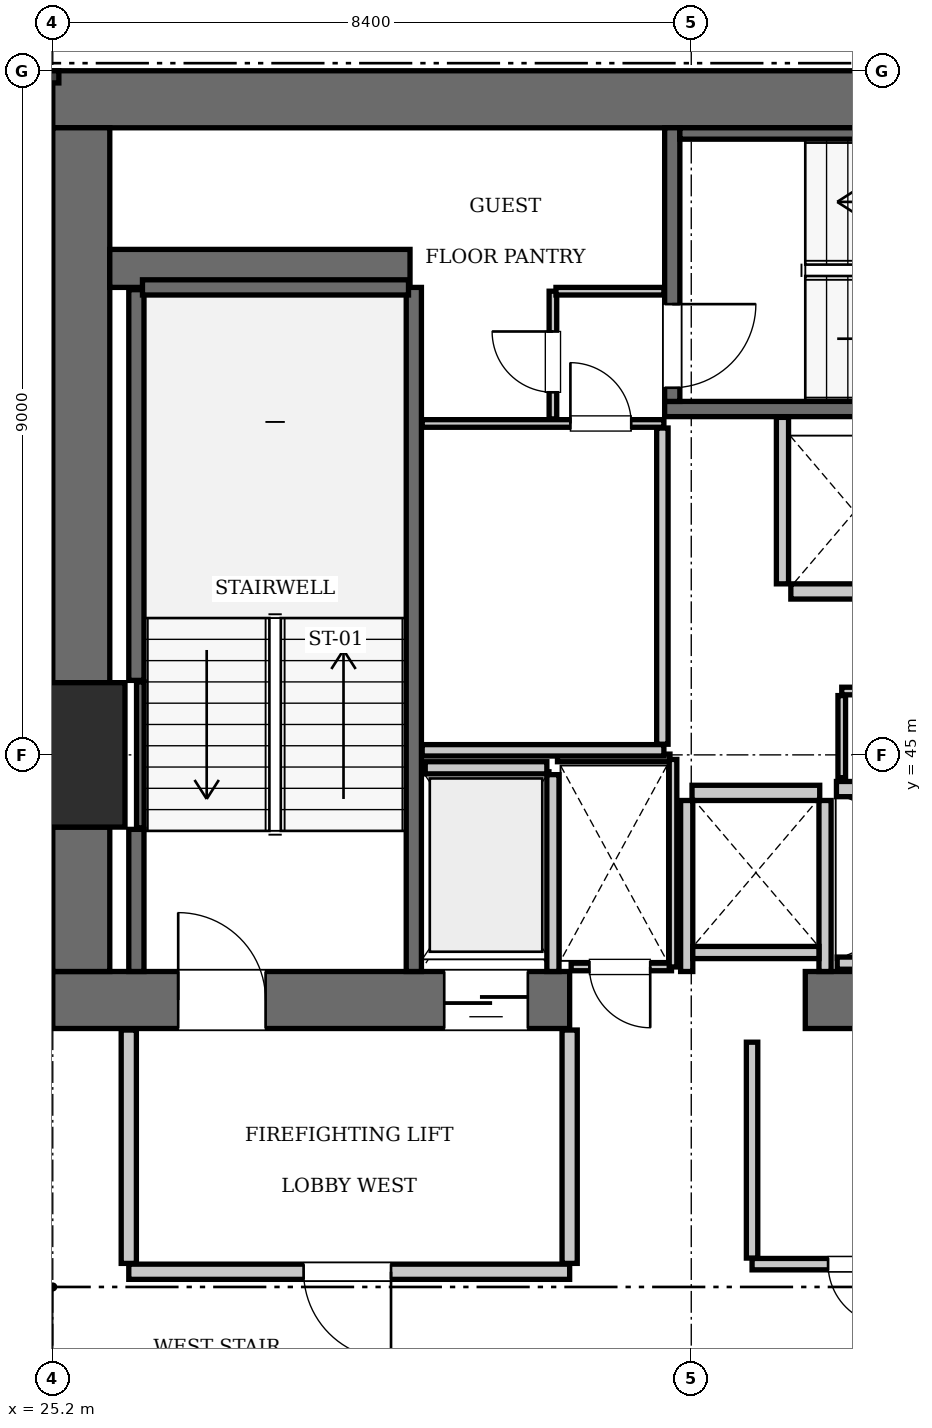
"""IFC4 building model, lengths in metres.
Left out: names, types, materials, properties, quantities, classifications, styles, units other than length and angle.
Written with IfcOpenShell. Run it as: python <this file> out.ifc"""

import sys

from ifc_helpers import new_model, si_unit, direction, frame, frame_2d, origin, origin_2d, place, context, subcontext, project, spatial, rectangle, extrude, element, fill, save


model = new_model("IFC4")
c1 = context("Model", 3, precision=1e-05, world=origin(), true_north=direction((0.0, 1.0)))
c2 = subcontext(c1, "Body", "Model", "MODEL_VIEW")
j1 = project(units=[si_unit("LENGTHUNIT", "METRE"), si_unit("PLANEANGLEUNIT", "RADIAN")], contexts=[c1])
p1 = place(None, origin())
s1 = spatial("IfcSite", under=j1, at=p1, CompositionType="ELEMENT")
p2 = place(p1, origin())
s2 = spatial("IfcBuilding", under=s1, at=p2, CompositionType="ELEMENT")
p3 = place(p2, frame((0.0, 0.0, 192.85)))
s3 = spatial("IfcBuildingStorey", under=s2, at=p3, CompositionType="ELEMENT", Elevation=192.85)
p4 = place(p3, frame((25.2, 45.0, 0.0), z_axis=(0.0, 0.0, 1.0), x_axis=(1.0, 0.0, 0.0)))
e1 = element("IfcColumn", 1, at=p4, inside=s3, PredefinedType="COLUMN", context=c2, shape_type="SweptSolid", body=[
    extrude(rectangle(XDim=1.9, YDim=1.9, at=origin_2d()), origin(), (0.0, 0.0, 1.0), 3.85),
])
p5 = place(p3, frame((25.2, 53.625, 0.0), z_axis=(0.0, 0.0, 1.0), x_axis=(1.0, 0.0, 0.0)))
e2 = element("IfcWall", 2, at=p5, inside=s3, PredefinedType="SHEAR", context=c2, shape_type="SweptSolid", body=[
    extrude(rectangle(XDim=25.2, YDim=0.75, at=frame_2d((12.6, 0.0))), origin(), (0.0, 0.0, 1.0), 3.85),
])
p6 = place(p3, frame((25.2, 41.775, 0.0), z_axis=(0.0, 0.0, 1.0), x_axis=(1.0, 0.0, 0.0)))
e3 = element("IfcWall", 3, at=p6, inside=s3, PredefinedType="SHEAR", context=c2, shape_type="SweptSolid", body=[
    extrude(rectangle(XDim=6.8, YDim=0.75, at=frame_2d((3.4, 0.0))), origin(), (0.0, 0.0, 1.0), 3.85),
])
p7 = place(p6, frame((1.65, 0.0, 0.0)))
e4 = element("IfcOpeningElement", 4, at=p7, cuts=e3, PredefinedType="OPENING", context=c2, shape_type="SweptSolid", body=[
    extrude(rectangle(XDim=1.15, YDim=2.15, at=frame_2d((0.575, 1.075))), frame((0.0, 0.385, 0.0), z_axis=(0.0, -1.0, 0.0), x_axis=(1.0, 0.0, 0.0)), (0.0, 0.0, 1.0), 0.77),
])
p8 = place(p6, frame((5.15, 0.0, 0.0)))
e5 = element("IfcOpeningElement", 5, at=p8, cuts=e3, PredefinedType="OPENING", context=c2, shape_type="SweptSolid", body=[
    extrude(rectangle(XDim=1.1, YDim=2.2, at=frame_2d((0.55, 1.1))), frame((0.0, 0.385, 0.0), z_axis=(0.0, -1.0, 0.0), x_axis=(1.0, 0.0, 0.0)), (0.0, 0.0, 1.0), 0.77),
])
p9 = place(p3, frame((35.1, 41.775, 0.0), z_axis=(0.0, 0.0, 1.0), x_axis=(1.0, 0.0, 0.0)))
e6 = element("IfcWall", 6, at=p9, inside=s3, PredefinedType="SHEAR", context=c2, shape_type="SweptSolid", body=[
    extrude(rectangle(XDim=5.4, YDim=0.75, at=frame_2d((2.7, 0.0))), origin(), (0.0, 0.0, 1.0), 3.85),
])
p10 = place(p3, frame((25.575, 42.15, 0.0), z_axis=(0.0, 0.0, 1.0), x_axis=(0.0, 1.0, 0.0)))
e7 = element("IfcWall", 7, at=p10, inside=s3, PredefinedType="SHEAR", context=c2, shape_type="SweptSolid", body=[
    extrude(rectangle(XDim=1.9, YDim=0.75, at=frame_2d((0.95, 0.0))), origin(), (0.0, 0.0, 1.0), 3.85),
])
p11 = place(p3, frame((25.575, 45.95, 0.0), z_axis=(0.0, 0.0, 1.0), x_axis=(0.0, 1.0, 0.0)))
e8 = element("IfcWall", 8, at=p11, inside=s3, PredefinedType="SHEAR", context=c2, shape_type="SweptSolid", body=[
    extrude(rectangle(XDim=7.3, YDim=0.75, at=frame_2d((3.65, 0.0))), origin(), (0.0, 0.0, 1.0), 3.85),
])
p12 = place(p3, frame((25.95, 51.4, 0.0), z_axis=(0.0, 0.0, 1.0), x_axis=(1.0, 0.0, 0.0)))
e9 = element("IfcWall", 9, at=p12, inside=s3, PredefinedType="SHEAR", context=c2, shape_type="SweptSolid", body=[
    extrude(rectangle(XDim=3.95, YDim=0.5, at=frame_2d((1.975, 0.0))), origin(), (0.0, 0.0, 1.0), 3.85),
])
p13 = place(p3, frame((29.95, 42.15, 0.0), z_axis=(0.0, 0.0, 1.0), x_axis=(0.0, 1.0, 0.0)))
e10 = element("IfcWall", 10, at=p13, inside=s3, PredefinedType="SOLIDWALL", context=c2, shape_type="SweptSolid", body=[
    extrude(rectangle(XDim=9.0, YDim=0.2, at=frame_2d((4.5, 0.0))), origin(), (0.0, 0.0, 1.0), 3.61),
])
p14 = place(p3, frame((26.3, 42.15, 0.0), z_axis=(0.0, 0.0, 1.0), x_axis=(0.0, 1.0, 0.0)))
e11 = element("IfcWall", 11, at=p14, inside=s3, PredefinedType="SOLIDWALL", context=c2, shape_type="SweptSolid", body=[
    extrude(rectangle(XDim=1.87, YDim=0.2, at=frame_2d((0.935, 0.0))), origin(), (0.0, 0.0, 1.0), 3.61),
])
p15 = place(p3, frame((26.3, 45.98, 0.0), z_axis=(0.0, 0.0, 1.0), x_axis=(0.0, 1.0, 0.0)))
e12 = element("IfcWall", 12, at=p15, inside=s3, PredefinedType="SOLIDWALL", context=c2, shape_type="SweptSolid", body=[
    extrude(rectangle(XDim=5.14, YDim=0.2, at=frame_2d((2.57, 0.0))), origin(), (0.0, 0.0, 1.0), 3.61),
])
p16 = place(p3, frame((26.38, 51.15, 0.0), z_axis=(0.0, 0.0, 1.0), x_axis=(1.0, 0.0, 0.0)))
e13 = element("IfcWall", 13, at=p16, inside=s3, PredefinedType="SOLIDWALL", context=c2, shape_type="SweptSolid", body=[
    extrude(rectangle(XDim=3.5, YDim=0.2, at=frame_2d((1.75, 0.0))), origin(), (0.0, 0.0, 1.0), 3.61),
])
p17 = place(p3, frame((26.352, 44.04, 0.0), z_axis=(0.0, 0.0, 1.0), x_axis=(0.0, 1.0, 0.0)))
e14 = element("IfcWall", 14, at=p17, inside=s3, PredefinedType="SOLIDWALL", context=c2, shape_type="SweptSolid", body=[
    extrude(rectangle(XDim=1.92, YDim=0.1, at=frame_2d((0.96, 0.0))), origin(), (0.0, 0.0, 1.0), 3.61),
])
p18 = place(p3, frame((33.25, 49.55, 0.0), z_axis=(0.0, 0.0, 1.0), x_axis=(1.0, 0.0, 0.0)))
e15 = element("IfcWall", 15, at=p18, inside=s3, PredefinedType="SOLIDWALL", context=c2, shape_type="SweptSolid", body=[
    extrude(rectangle(XDim=9.1, YDim=0.2, at=frame_2d((4.55, 0.0))), origin(), (0.0, 0.0, 1.0), 3.61),
])
p19 = place(p3, frame((33.35, 49.65, 0.0), z_axis=(0.0, 0.0, 1.0), x_axis=(0.0, 1.0, 0.0)))
e16 = element("IfcWall", 16, at=p19, inside=s3, PredefinedType="SOLIDWALL", context=c2, shape_type="SweptSolid", body=[
    extrude(rectangle(XDim=3.6, YDim=0.2, at=frame_2d((1.8, 0.0))), origin(), (0.0, 0.0, 1.0), 3.61),
])
p20 = place(p19, frame((0.18, 0.0, 0.0)))
e17 = element("IfcOpeningElement", 17, at=p20, cuts=e16, PredefinedType="OPENING", context=c2, shape_type="SweptSolid", body=[
    extrude(rectangle(XDim=1.1, YDim=2.15, at=frame_2d((0.55, 1.075))), frame((0.0, 0.11, 0.0), z_axis=(0.0, -1.0, 0.0), x_axis=(1.0, 0.0, 0.0)), (0.0, 0.0, 1.0), 0.22),
])
p21 = place(p3, frame((33.45, 53.175, 0.0), z_axis=(0.0, 0.0, 1.0), x_axis=(1.0, 0.0, 0.0)))
e18 = element("IfcWall", 18, at=p21, inside=s3, PredefinedType="SOLIDWALL", context=c2, shape_type="SweptSolid", body=[
    extrude(rectangle(XDim=8.7, YDim=0.15, at=frame_2d((4.35, 0.0))), origin(), (0.0, 0.0, 1.0), 3.61),
])
p22 = place(p3, frame((35.51, 44.55, 0.0), z_axis=(0.0, 0.0, 1.0), x_axis=(1.0, 0.0, 0.0)))
e19 = element("IfcWall", 19, at=p22, inside=s3, PredefinedType="SOLIDWALL", context=c2, shape_type="SweptSolid", body=[
    extrude(rectangle(XDim=1.68, YDim=0.2, at=frame_2d((0.84, 0.0))), origin(), (0.0, 0.0, 1.0), 3.61),
])
p23 = place(p3, frame((34.91, 47.15, 0.0), z_axis=(0.0, 0.0, 1.0), x_axis=(1.0, 0.0, 0.0)))
e20 = element("IfcWall", 20, at=p23, inside=s3, PredefinedType="SOLIDWALL", context=c2, shape_type="SweptSolid", body=[
    extrude(rectangle(XDim=1.68, YDim=0.2, at=frame_2d((0.84, 0.0))), origin(), (0.0, 0.0, 1.0), 3.61),
])
p24 = place(p3, frame((33.61, 44.5, 0.0), z_axis=(0.0, 0.0, 1.0), x_axis=(1.0, 0.0, 0.0)))
e21 = element("IfcWall", 21, at=p24, inside=s3, PredefinedType="SOLIDWALL", context=c2, shape_type="SweptSolid", body=[
    extrude(rectangle(XDim=1.68, YDim=0.2, at=frame_2d((0.84, 0.0))), origin(), (0.0, 0.0, 1.0), 3.61),
])
p25 = place(p3, frame((30.1, 44.83, 0.0), z_axis=(0.0, 0.0, 1.0), x_axis=(1.0, 0.0, 0.0)))
e22 = element("IfcWall", 22, at=p25, inside=s3, PredefinedType="SOLIDWALL", context=c2, shape_type="SweptSolid", body=[
    extrude(rectangle(XDim=1.6, YDim=0.16, at=frame_2d((0.8, 0.0))), origin(), (0.0, 0.0, 1.0), 3.61),
])
p26 = place(p3, frame((31.78, 42.15, 0.0), z_axis=(0.0, 0.0, 1.0), x_axis=(0.0, 1.0, 0.0)))
e23 = element("IfcWall", 23, at=p26, inside=s3, PredefinedType="SOLIDWALL", context=c2, shape_type="SweptSolid", body=[
    extrude(rectangle(XDim=2.59, YDim=0.16, at=frame_2d((1.295, 0.0))), origin(), (0.0, 0.0, 1.0), 3.61),
])
p27 = place(p3, frame((35.52, 42.26, 0.0), z_axis=(0.0, 0.0, 1.0), x_axis=(1.0, 0.0, 0.0)))
e24 = element("IfcWall", 24, at=p27, inside=s3, PredefinedType="SOLIDWALL", context=c2, shape_type="SweptSolid", body=[
    extrude(rectangle(XDim=5.02, YDim=0.16, at=frame_2d((2.51, 0.0))), origin(), (0.0, 0.0, 1.0), 3.61),
])
p28 = place(p3, frame((34.8, 47.25, 0.0), z_axis=(0.0, 0.0, 1.0), x_axis=(0.0, 1.0, 0.0)))
e25 = element("IfcWall", 25, at=p28, inside=s3, PredefinedType="SOLIDWALL", context=c2, shape_type="SweptSolid", body=[
    extrude(rectangle(XDim=2.19, YDim=0.16, at=frame_2d((1.095, 0.0))), origin(), (0.0, 0.0, 1.0), 3.61),
])
for number, where, z_axis, x_axis in (
    (26, (33.54, 42.15, 0.0), (0.0, 0.0, 1.0), (0.0, 1.0, 0.0)),
    (27, (35.36, 42.15, 0.0), (0.0, 0.0, 1.0), (0.0, 1.0, 0.0)),
):
    element("IfcWall", number, at=place(p3, frame(where, z_axis=z_axis, x_axis=x_axis)), inside=s3, PredefinedType="SOLIDWALL", context=c2, shape_type="SweptSolid", body=[
        extrude(rectangle(XDim=2.25, YDim=0.16, at=frame_2d((1.125, 0.0))), origin(), (0.0, 0.0, 1.0), 3.61),
    ])
p29 = place(p3, frame((33.62, 42.4, 0.0), z_axis=(0.0, 0.0, 1.0), x_axis=(1.0, 0.0, 0.0)))
e28 = element("IfcWall", 28, at=p29, inside=s3, PredefinedType="SOLIDWALL", context=c2, shape_type="SweptSolid", body=[
    extrude(rectangle(XDim=1.66, YDim=0.16, at=frame_2d((0.83, 0.0))), origin(), (0.0, 0.0, 1.0), 3.61),
])
p30 = place(p3, frame((26.2, 38.2, 0.0), z_axis=(0.0, 0.0, 1.0), x_axis=(1.0, 0.0, 0.0)))
e29 = element("IfcWall", 29, at=p30, inside=s3, PredefinedType="PARTITIONING", context=c2, shape_type="SweptSolid", body=[
    extrude(rectangle(XDim=5.8, YDim=0.2, at=frame_2d((2.9, 0.0))), origin(), (0.0, 0.0, 1.0), 3.61),
])
p31 = place(p30, frame((2.3, 0.0, 0.0)))
e30 = element("IfcOpeningElement", 30, at=p31, cuts=e29, PredefinedType="OPENING", context=c2, shape_type="SweptSolid", body=[
    extrude(rectangle(XDim=1.15, YDim=2.15, at=frame_2d((0.575, 1.075))), frame((0.0, 0.11, 0.0), z_axis=(0.0, -1.0, 0.0), x_axis=(1.0, 0.0, 0.0)), (0.0, 0.0, 1.0), 0.22),
])
for number, where, z_axis, x_axis in (
    (31, (26.2, 38.31, 0.0), (0.0, 0.0, 1.0), (0.0, 1.0, 0.0)),
    (32, (32.0, 38.31, 0.0), (0.0, 0.0, 1.0), (0.0, 1.0, 0.0)),
):
    element("IfcWall", number, at=place(p3, frame(where, z_axis=z_axis, x_axis=x_axis)), inside=s3, PredefinedType="PARTITIONING", context=c2, shape_type="SweptSolid", body=[
        extrude(rectangle(XDim=3.07, YDim=0.2, at=frame_2d((1.535, 0.0))), origin(), (0.0, 0.0, 1.0), 3.61),
    ])
p32 = place(p3, frame((32.02, 42.21, 0.0), z_axis=(0.0, 0.0, 1.0), x_axis=(1.0, 0.0, 0.0)))
e33 = element("IfcWall", 33, at=p32, inside=s3, PredefinedType="PARTITIONING", context=c2, shape_type="SweptSolid", body=[
    extrude(rectangle(XDim=1.32, YDim=0.1, at=frame_2d((0.66, 0.0))), origin(), (0.0, 0.0, 1.0), 3.61),
])
p33 = place(p32, frame((0.24, 0.0, 0.0)))
e34 = element("IfcOpeningElement", 34, at=p33, cuts=e33, PredefinedType="OPENING", context=c2, shape_type="SweptSolid", body=[
    extrude(rectangle(XDim=0.8, YDim=2.05, at=frame_2d((0.4, 1.025))), frame((0.0, 0.06, 0.0), z_axis=(0.0, -1.0, 0.0), x_axis=(1.0, 0.0, 0.0)), (0.0, 0.0, 1.0), 0.12),
])
p34 = place(p3, frame((31.84, 44.96, 0.0), z_axis=(0.0, 0.0, 1.0), x_axis=(1.0, 0.0, 0.0)))
e35 = element("IfcWall", 35, at=p34, inside=s3, PredefinedType="PARTITIONING", context=c2, shape_type="SweptSolid", body=[
    extrude(rectangle(XDim=1.48, YDim=0.1, at=frame_2d((0.74, 0.0))), origin(), (0.0, 0.0, 1.0), 3.61),
])
p35 = place(p3, frame((33.36, 42.21, 0.0), z_axis=(0.0, 0.0, 1.0), x_axis=(0.0, 1.0, 0.0)))
e36 = element("IfcWall", 36, at=p35, inside=s3, PredefinedType="PARTITIONING", context=c2, shape_type="SweptSolid", body=[
    extrude(rectangle(XDim=2.73, YDim=0.1, at=frame_2d((1.365, 0.0))), origin(), (0.0, 0.0, 1.0), 3.61),
])
p36 = place(p3, frame((35.58, 45.84, 0.0), z_axis=(0.0, 0.0, 1.0), x_axis=(1.0, 0.0, 0.0)))
e37 = element("IfcWall", 37, at=p36, inside=s3, PredefinedType="PARTITIONING", context=c2, shape_type="SweptSolid", body=[
    extrude(rectangle(XDim=2.36, YDim=0.1, at=frame_2d((1.18, 0.0))), origin(), (0.0, 0.0, 1.0), 3.61),
])
p37 = place(p36, frame((0.7, 0.0, 0.0)))
e38 = element("IfcOpeningElement", 38, at=p37, cuts=e37, PredefinedType="OPENING", context=c2, shape_type="SweptSolid", body=[
    extrude(rectangle(XDim=0.8, YDim=2.05, at=frame_2d((0.4, 1.025))), frame((0.0, 0.06, 0.0), z_axis=(0.0, -1.0, 0.0), x_axis=(1.0, 0.0, 0.0)), (0.0, 0.0, 1.0), 0.12),
])
p38 = place(p3, frame((35.58, 44.7, 0.0), z_axis=(0.0, 0.0, 1.0), x_axis=(0.0, 1.0, 0.0)))
e39 = element("IfcWall", 39, at=p38, inside=s3, PredefinedType="PARTITIONING", context=c2, shape_type="SweptSolid", body=[
    extrude(rectangle(XDim=1.08, YDim=0.1, at=frame_2d((0.54, 0.0))), origin(), (0.0, 0.0, 1.0), 3.61),
])
p39 = place(p3, frame((30.06, 45.06, 0.0), z_axis=(0.0, 0.0, 1.0), x_axis=(1.0, 0.0, 0.0)))
e40 = element("IfcWall", 40, at=p39, inside=s3, PredefinedType="PARTITIONING", context=c2, shape_type="SweptSolid", body=[
    extrude(rectangle(XDim=3.18, YDim=0.15, at=frame_2d((1.59, 0.0))), origin(), (0.0, 0.0, 1.0), 3.61),
])
p40 = place(p3, frame((33.22, 45.14, 0.0), z_axis=(0.0, 0.0, 1.0), x_axis=(0.0, 1.0, 0.0)))
e41 = element("IfcWall", 41, at=p40, inside=s3, PredefinedType="PARTITIONING", context=c2, shape_type="SweptSolid", body=[
    extrude(rectangle(XDim=4.16, YDim=0.15, at=frame_2d((2.08, 0.0))), origin(), (0.0, 0.0, 1.0), 3.61),
])
p41 = place(p3, frame((30.06, 49.36, 0.0), z_axis=(0.0, 0.0, 1.0), x_axis=(1.0, 0.0, 0.0)))
e42 = element("IfcWall", 42, at=p41, inside=s3, PredefinedType="PARTITIONING", context=c2, shape_type="SweptSolid", body=[
    extrude(rectangle(XDim=3.18, YDim=0.1, at=frame_2d((1.59, 0.0))), origin(), (0.0, 0.0, 1.0), 3.61),
])
p42 = place(p41, frame((1.95, 0.0, 0.0)))
e43 = element("IfcOpeningElement", 43, at=p42, cuts=e42, PredefinedType="OPENING", context=c2, shape_type="SweptSolid", body=[
    extrude(rectangle(XDim=0.8, YDim=2.05, at=frame_2d((0.4, 1.025))), frame((0.0, 0.06, 0.0), z_axis=(0.0, -1.0, 0.0), x_axis=(1.0, 0.0, 0.0)), (0.0, 0.0, 1.0), 0.12),
])
p43 = place(p3, frame((31.78, 49.42, 0.0), z_axis=(0.0, 0.0, 1.0), x_axis=(0.0, 1.0, 0.0)))
e44 = element("IfcWall", 44, at=p43, inside=s3, PredefinedType="PARTITIONING", context=c2, shape_type="SweptSolid", body=[
    extrude(rectangle(XDim=1.68, YDim=0.1, at=frame_2d((0.84, 0.0))), origin(), (0.0, 0.0, 1.0), 3.61),
])
p44 = place(p43, frame((0.35, 0.0, 0.0)))
e45 = element("IfcOpeningElement", 45, at=p44, cuts=e44, PredefinedType="OPENING", context=c2, shape_type="SweptSolid", body=[
    extrude(rectangle(XDim=0.8, YDim=2.05, at=frame_2d((0.4, 1.025))), frame((0.0, 0.06, 0.0), z_axis=(0.0, -1.0, 0.0), x_axis=(1.0, 0.0, 0.0)), (0.0, 0.0, 1.0), 0.12),
])
p45 = place(p3, frame((31.82, 51.1, 0.0), z_axis=(0.0, 0.0, 1.0), x_axis=(1.0, 0.0, 0.0)))
e46 = element("IfcWall", 46, at=p45, inside=s3, PredefinedType="PARTITIONING", context=c2, shape_type="SweptSolid", body=[
    extrude(rectangle(XDim=1.42, YDim=0.1, at=frame_2d((0.71, 0.0))), origin(), (0.0, 0.0, 1.0), 3.61),
])
p46 = place(p3, frame((34.4, 38.3, 0.0), z_axis=(0.0, 0.0, 1.0), x_axis=(1.0, 0.0, 0.0)))
e47 = element("IfcWall", 47, at=p46, inside=s3, PredefinedType="PARTITIONING", context=c2, shape_type="SweptSolid", body=[
    extrude(rectangle(XDim=2.88, YDim=0.15, at=frame_2d((1.44, 0.0))), origin(), (0.0, 0.0, 1.0), 3.61),
])
p47 = place(p46, frame((1.0, 0.0, 0.0)))
e48 = element("IfcOpeningElement", 48, at=p47, cuts=e47, PredefinedType="OPENING", context=c2, shape_type="SweptSolid", body=[
    extrude(rectangle(XDim=0.8, YDim=2.05, at=frame_2d((0.4, 1.025))), frame((0.0, 0.085, 0.0), z_axis=(0.0, -1.0, 0.0), x_axis=(1.0, 0.0, 0.0)), (0.0, 0.0, 1.0), 0.17),
])
p48 = place(p3, frame((34.4, 38.38, 0.0), z_axis=(0.0, 0.0, 1.0), x_axis=(0.0, 1.0, 0.0)))
e49 = element("IfcWall", 49, at=p48, inside=s3, PredefinedType="PARTITIONING", context=c2, shape_type="SweptSolid", body=[
    extrude(rectangle(XDim=2.84, YDim=0.15, at=frame_2d((1.42, 0.0))), origin(), (0.0, 0.0, 1.0), 3.61),
])
p49 = place(p7, origin())
e50 = element("IfcDoor", 50, at=p49, inside=s3, OperationType="SINGLE_SWING_LEFT", PredefinedType="DOOR", context=c2, shape_type="SweptSolid", body=[
    extrude(rectangle(XDim=1.15, YDim=2.15, at=frame_2d((0.575, 1.075))), frame((0.0, 0.025, 0.0), z_axis=(0.0, -1.0, 0.0), x_axis=(1.0, 0.0, 0.0)), (0.0, 0.0, 1.0), 0.05),
])
fill(e4, e50)
p50 = place(p20, frame((1.1, 0.0, 0.0), z_axis=(0.0, 0.0, 1.0), x_axis=(-1.0, 0.0, 0.0)))
e51 = element("IfcDoor", 51, at=p50, inside=s3, OperationType="SINGLE_SWING_LEFT", PredefinedType="DOOR", context=c2, shape_type="SweptSolid", body=[
    extrude(rectangle(XDim=1.1, YDim=2.15, at=frame_2d((0.55, 1.075))), frame((0.0, 0.025, 0.0), z_axis=(0.0, -1.0, 0.0), x_axis=(1.0, 0.0, 0.0)), (0.0, 0.0, 1.0), 0.05),
])
fill(e17, e51)
p51 = place(p8, frame((1.1, 0.0, 0.0), z_axis=(0.0, 0.0, 1.0), x_axis=(-1.0, 0.0, 0.0)))
e52 = element("IfcDoor", 52, at=p51, inside=s3, OperationType="SLIDING_TO_LEFT", PredefinedType="DOOR", context=c2, shape_type="SweptSolid", body=[
    extrude(rectangle(XDim=1.1, YDim=2.2, at=frame_2d((0.55, 1.1))), frame((0.0, 0.025, 0.0), z_axis=(0.0, -1.0, 0.0), x_axis=(1.0, 0.0, 0.0)), (0.0, 0.0, 1.0), 0.05),
])
fill(e5, e52)
p52 = place(p31, frame((1.15, 0.0, 0.0), z_axis=(0.0, 0.0, 1.0), x_axis=(-1.0, 0.0, 0.0)))
e53 = element("IfcDoor", 53, at=p52, inside=s3, OperationType="SINGLE_SWING_LEFT", PredefinedType="DOOR", context=c2, shape_type="SweptSolid", body=[
    extrude(rectangle(XDim=1.15, YDim=2.15, at=frame_2d((0.575, 1.075))), frame((0.0, 0.025, 0.0), z_axis=(0.0, -1.0, 0.0), x_axis=(1.0, 0.0, 0.0)), (0.0, 0.0, 1.0), 0.05),
])
fill(e30, e53)
p53 = place(p33, frame((0.8, 0.0, 0.0), z_axis=(0.0, 0.0, 1.0), x_axis=(-1.0, 0.0, 0.0)))
e54 = element("IfcDoor", 54, at=p53, inside=s3, OperationType="SINGLE_SWING_LEFT", PredefinedType="DOOR", context=c2, shape_type="SweptSolid", body=[
    extrude(rectangle(XDim=0.8, YDim=2.05, at=frame_2d((0.4, 1.025))), frame((0.0, 0.025, 0.0), z_axis=(0.0, -1.0, 0.0), x_axis=(1.0, 0.0, 0.0)), (0.0, 0.0, 1.0), 0.05),
])
fill(e34, e54)
p54 = place(p42, origin())
e55 = element("IfcDoor", 55, at=p54, inside=s3, OperationType="SINGLE_SWING_LEFT", PredefinedType="DOOR", context=c2, shape_type="SweptSolid", body=[
    extrude(rectangle(XDim=0.8, YDim=2.05, at=frame_2d((0.4, 1.025))), frame((0.0, 0.025, 0.0), z_axis=(0.0, -1.0, 0.0), x_axis=(1.0, 0.0, 0.0)), (0.0, 0.0, 1.0), 0.05),
])
fill(e43, e55)
p55 = place(p44, origin())
e56 = element("IfcDoor", 56, at=p55, inside=s3, OperationType="SINGLE_SWING_RIGHT", PredefinedType="DOOR", context=c2, shape_type="SweptSolid", body=[
    extrude(rectangle(XDim=0.8, YDim=2.05, at=frame_2d((0.4, 1.025))), frame((0.0, 0.025, 0.0), z_axis=(0.0, -1.0, 0.0), x_axis=(1.0, 0.0, 0.0)), (0.0, 0.0, 1.0), 0.05),
])
fill(e45, e56)
p56 = place(p47, frame((0.8, 0.0, 0.0), z_axis=(0.0, 0.0, 1.0), x_axis=(-1.0, 0.0, 0.0)))
e57 = element("IfcDoor", 57, at=p56, inside=s3, OperationType="SINGLE_SWING_LEFT", PredefinedType="DOOR", context=c2, shape_type="SweptSolid", body=[
    extrude(rectangle(XDim=0.8, YDim=2.05, at=frame_2d((0.4, 1.025))), frame((0.0, 0.025, 0.0), z_axis=(0.0, -1.0, 0.0), x_axis=(1.0, 0.0, 0.0)), (0.0, 0.0, 1.0), 0.05),
])
fill(e48, e57)
save(model, sys.argv[1])
